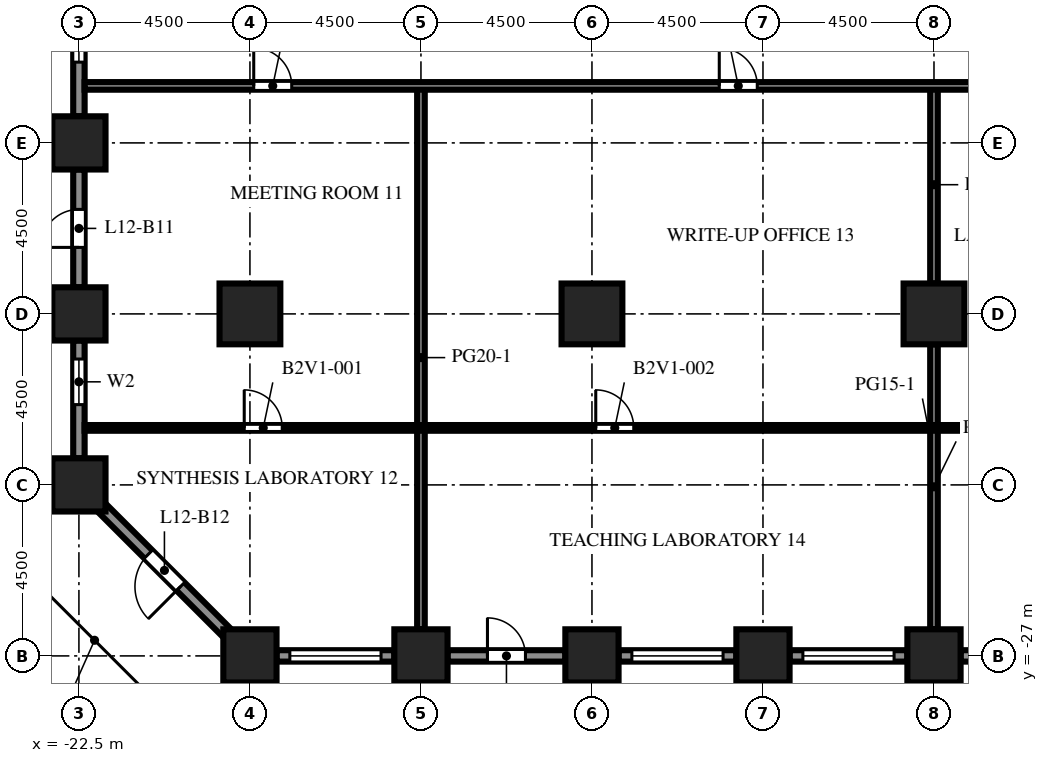
"""IFC4 building model, lengths in metres.
Left out: names, types, materials, properties, quantities, classifications, styles, units other than length and angle.
Written with IfcOpenShell. Run it as: python <this file> out.ifc"""

import sys

from ifc_helpers import new_model, si_unit, direction, frame, frame_2d, origin, origin_2d, place, context, subcontext, project, spatial, rectangle, extrude, element, fill, save


model = new_model("IFC4")
c1 = context("Model", 3, precision=1e-05, world=origin(), true_north=direction((0.0, 1.0)))
c2 = subcontext(c1, "Body", "Model", "MODEL_VIEW")
j1 = project(units=[si_unit("LENGTHUNIT", "METRE"), si_unit("PLANEANGLEUNIT", "RADIAN")], contexts=[c1])
p1 = place(None, origin())
s1 = spatial("IfcSite", under=j1, at=p1, CompositionType="ELEMENT")
p2 = place(p1, origin())
s2 = spatial("IfcBuilding", under=s1, at=p2, CompositionType="ELEMENT")
p3 = place(p2, frame((0.0, 0.0, 54.2)))
s3 = spatial("IfcBuildingStorey", under=s2, at=p3, CompositionType="ELEMENT", Elevation=54.2)
for number, where, z_axis, x_axis in (
    (1, (-22.5, -22.5, 0.0), (0.0, 0.0, 1.0), (1.0, 0.0, 0.0)),
    (2, (-22.5, -18.0, 0.0), (0.0, 0.0, 1.0), (1.0, 0.0, 0.0)),
    (3, (-22.5, -13.5, 0.0), (0.0, 0.0, 1.0), (1.0, 0.0, 0.0)),
    (4, (-18.0, -27.0, 0.0), (0.0, 0.0, 1.0), (1.0, 0.0, 0.0)),
    (5, (-13.5, -27.0, 0.0), (0.0, 0.0, 1.0), (1.0, 0.0, 0.0)),
    (6, (-9.0, -27.0, 0.0), (0.0, 0.0, 1.0), (1.0, 0.0, 0.0)),
    (7, (-4.5, -27.0, 0.0), (0.0, 0.0, 1.0), (1.0, 0.0, 0.0)),
    (8, (0.0, -27.0, 0.0), (0.0, 0.0, 1.0), (1.0, 0.0, 0.0)),
):
    element("IfcColumn", number, at=place(p3, frame(where, z_axis=z_axis, x_axis=x_axis)), inside=s3, PredefinedType="COLUMN", context=c2, shape_type="SweptSolid", body=[
        extrude(rectangle(XDim=1.4, YDim=1.4, at=origin_2d()), origin(), (0.0, 0.0, 1.0), 4.1),
    ])
for number, where, z_axis, x_axis in (
    (9, (-18.0, -18.0, 0.0), (0.0, 0.0, 1.0), (1.0, 0.0, 0.0)),
    (10, (-9.0, -18.0, 0.0), (0.0, 0.0, 1.0), (1.0, 0.0, 0.0)),
    (11, (0.0, -18.0, 0.0), (0.0, 0.0, 1.0), (1.0, 0.0, 0.0)),
):
    element("IfcColumn", number, at=place(p3, frame(where, z_axis=z_axis, x_axis=x_axis)), inside=s3, PredefinedType="COLUMN", context=c2, shape_type="SweptSolid", body=[
        extrude(rectangle(XDim=1.6, YDim=1.6, at=origin_2d()), origin(), (0.0, 0.0, 1.0), 4.1),
    ])
p4 = place(p3, frame((-14.2, -27.0, 0.0), z_axis=(0.0, 0.0, 1.0), x_axis=(-1.0, 0.0, 0.0)))
e12 = element("IfcWall", 12, at=p4, inside=s3, PredefinedType="SOLIDWALL", context=c2, shape_type="SweptSolid", body=[
    extrude(rectangle(XDim=3.1, YDim=0.3, at=frame_2d((1.55, 0.0))), origin(), (0.0, 0.0, 1.0), 2.75),
])
p5 = place(p4, frame((0.35, 0.0, 0.8)))
e13 = element("IfcOpeningElement", 13, at=p5, cuts=e12, PredefinedType="OPENING", context=c2, shape_type="SweptSolid", body=[
    extrude(rectangle(XDim=2.4, YDim=1.7, at=frame_2d((1.2, 0.85))), frame((0.0, 0.16, 0.0), z_axis=(0.0, -1.0, 0.0), x_axis=(1.0, 0.0, 0.0)), (0.0, 0.0, 1.0), 0.32),
])
p6 = place(p3, frame((-9.7, -27.0, 0.0), z_axis=(0.0, 0.0, 1.0), x_axis=(-1.0, 0.0, 0.0)))
e14 = element("IfcWall", 14, at=p6, inside=s3, PredefinedType="SOLIDWALL", context=c2, shape_type="SweptSolid", body=[
    extrude(rectangle(XDim=3.1, YDim=0.3, at=frame_2d((1.55, 0.0))), origin(), (0.0, 0.0, 1.0), 2.75),
])
p7 = place(p6, frame((1.05, 0.0, 0.0)))
e15 = element("IfcOpeningElement", 15, at=p7, cuts=e14, PredefinedType="OPENING", context=c2, shape_type="SweptSolid", body=[
    extrude(rectangle(XDim=1.0, YDim=2.2, at=frame_2d((0.5, 1.1))), frame((0.0, 0.16, 0.0), z_axis=(0.0, -1.0, 0.0), x_axis=(1.0, 0.0, 0.0)), (0.0, 0.0, 1.0), 0.32),
])
p8 = place(p3, frame((-5.2, -27.0, 0.0), z_axis=(0.0, 0.0, 1.0), x_axis=(-1.0, 0.0, 0.0)))
e16 = element("IfcWall", 16, at=p8, inside=s3, PredefinedType="SOLIDWALL", context=c2, shape_type="SweptSolid", body=[
    extrude(rectangle(XDim=3.1, YDim=0.3, at=frame_2d((1.55, 0.0))), origin(), (0.0, 0.0, 1.0), 2.75),
])
p9 = place(p8, frame((0.35, 0.0, 0.8)))
e17 = element("IfcOpeningElement", 17, at=p9, cuts=e16, PredefinedType="OPENING", context=c2, shape_type="SweptSolid", body=[
    extrude(rectangle(XDim=2.4, YDim=1.7, at=frame_2d((1.2, 0.85))), frame((0.0, 0.16, 0.0), z_axis=(0.0, -1.0, 0.0), x_axis=(1.0, 0.0, 0.0)), (0.0, 0.0, 1.0), 0.32),
])
p10 = place(p3, frame((-0.7, -27.0, 0.0), z_axis=(0.0, 0.0, 1.0), x_axis=(-1.0, 0.0, 0.0)))
e18 = element("IfcWall", 18, at=p10, inside=s3, PredefinedType="SOLIDWALL", context=c2, shape_type="SweptSolid", body=[
    extrude(rectangle(XDim=3.1, YDim=0.3, at=frame_2d((1.55, 0.0))), origin(), (0.0, 0.0, 1.0), 2.75),
])
p11 = place(p10, frame((0.35, 0.0, 0.8)))
e19 = element("IfcOpeningElement", 19, at=p11, cuts=e18, PredefinedType="OPENING", context=c2, shape_type="SweptSolid", body=[
    extrude(rectangle(XDim=2.4, YDim=1.7, at=frame_2d((1.2, 0.85))), frame((0.0, 0.16, 0.0), z_axis=(0.0, -1.0, 0.0), x_axis=(1.0, 0.0, 0.0)), (0.0, 0.0, 1.0), 0.32),
])
p12 = place(p3, frame((3.8, -27.0, 0.0), z_axis=(0.0, 0.0, 1.0), x_axis=(-1.0, 0.0, 0.0)))
e20 = element("IfcWall", 20, at=p12, inside=s3, PredefinedType="SOLIDWALL", context=c2, shape_type="SweptSolid", body=[
    extrude(rectangle(XDim=3.1, YDim=0.3, at=frame_2d((1.55, 0.0))), origin(), (0.0, 0.0, 1.0), 2.75),
])
p13 = place(p12, frame((0.35, 0.0, 0.8)))
e21 = element("IfcOpeningElement", 21, at=p13, cuts=e20, PredefinedType="OPENING", context=c2, shape_type="SweptSolid", body=[
    extrude(rectangle(XDim=2.4, YDim=1.7, at=frame_2d((1.2, 0.85))), frame((0.0, 0.16, 0.0), z_axis=(0.0, -1.0, 0.0), x_axis=(1.0, 0.0, 0.0)), (0.0, 0.0, 1.0), 0.32),
])
p14 = place(p3, frame((-22.5, -12.8, 0.0), z_axis=(0.0, 0.0, 1.0), x_axis=(0.0, 1.0, 0.0)))
e22 = element("IfcWall", 22, at=p14, inside=s3, PredefinedType="SOLIDWALL", context=c2, shape_type="SweptSolid", body=[
    extrude(rectangle(XDim=3.1, YDim=0.3, at=frame_2d((1.55, 0.0))), origin(), (0.0, 0.0, 1.0), 2.75),
])
p15 = place(p14, frame((1.425, 0.0, 0.8)))
e23 = element("IfcOpeningElement", 23, at=p15, cuts=e22, PredefinedType="OPENING", context=c2, shape_type="SweptSolid", body=[
    extrude(rectangle(XDim=1.2, YDim=1.7, at=frame_2d((0.6, 0.85))), frame((0.0, 0.16, 0.0), z_axis=(0.0, -1.0, 0.0), x_axis=(1.0, 0.0, 0.0)), (0.0, 0.0, 1.0), 0.32),
])
p16 = place(p3, frame((-22.5, -17.3, 0.0), z_axis=(0.0, 0.0, 1.0), x_axis=(0.0, 1.0, 0.0)))
e24 = element("IfcWall", 24, at=p16, inside=s3, PredefinedType="SOLIDWALL", context=c2, shape_type="SweptSolid", body=[
    extrude(rectangle(XDim=3.1, YDim=0.3, at=frame_2d((1.55, 0.0))), origin(), (0.0, 0.0, 1.0), 2.75),
])
p17 = place(p16, frame((1.05, 0.0, 0.0)))
e25 = element("IfcOpeningElement", 25, at=p17, cuts=e24, PredefinedType="OPENING", context=c2, shape_type="SweptSolid", body=[
    extrude(rectangle(XDim=1.0, YDim=2.2, at=frame_2d((0.5, 1.1))), frame((0.0, 0.16, 0.0), z_axis=(0.0, -1.0, 0.0), x_axis=(1.0, 0.0, 0.0)), (0.0, 0.0, 1.0), 0.32),
])
p18 = place(p3, frame((-22.5, -21.8, 0.0), z_axis=(0.0, 0.0, 1.0), x_axis=(0.0, 1.0, 0.0)))
e26 = element("IfcWall", 26, at=p18, inside=s3, PredefinedType="SOLIDWALL", context=c2, shape_type="SweptSolid", body=[
    extrude(rectangle(XDim=3.1, YDim=0.3, at=frame_2d((1.55, 0.0))), origin(), (0.0, 0.0, 1.0), 2.75),
])
p19 = place(p18, frame((1.413, 0.0, 0.8)))
e27 = element("IfcOpeningElement", 27, at=p19, cuts=e26, PredefinedType="OPENING", context=c2, shape_type="SweptSolid", body=[
    extrude(rectangle(XDim=1.2, YDim=1.7, at=frame_2d((0.6, 0.85))), frame((0.0, 0.16, 0.0), z_axis=(0.0, -1.0, 0.0), x_axis=(1.0, 0.0, 0.0)), (0.0, 0.0, 1.0), 0.32),
])
p20 = place(p3, frame((-18.594, -26.406, 0.0), z_axis=(0.0, 0.0, 1.0), x_axis=(-0.707106781187, 0.707106781187, 0.0)))
e28 = element("IfcWall", 28, at=p20, inside=s3, PredefinedType="SOLIDWALL", context=c2, shape_type="SweptSolid", body=[
    extrude(rectangle(XDim=4.684, YDim=0.3, at=frame_2d((2.342, 0.0))), origin(), (0.0, 0.0, 1.0), 2.75),
])
p21 = place(p20, frame((1.742, 0.0, 0.0)))
e29 = element("IfcOpeningElement", 29, at=p21, cuts=e28, PredefinedType="OPENING", context=c2, shape_type="SweptSolid", body=[
    extrude(rectangle(XDim=1.2, YDim=2.2, at=frame_2d((0.6, 1.1))), frame((0.0, 0.16, 0.0), z_axis=(0.0, -1.0, 0.0), x_axis=(1.0, 0.0, 0.0)), (0.0, 0.0, 1.0), 0.32),
])
p22 = place(p3, frame((-13.5, -26.3, 0.0), z_axis=(0.0, 0.0, 1.0), x_axis=(0.0, 1.0, 0.0)))
e30 = element("IfcWall", 30, at=p22, inside=s3, PredefinedType="PARTITIONING", context=c2, shape_type="SweptSolid", body=[
    extrude(rectangle(XDim=14.3, YDim=0.2, at=frame_2d((7.15, 0.0))), origin(), (0.0, 0.0, 1.0), 3.65),
])
p23 = place(p3, frame((0.0, -26.3, 0.0), z_axis=(0.0, 0.0, 1.0), x_axis=(0.0, 1.0, 0.0)))
e31 = element("IfcWall", 31, at=p23, inside=s3, PredefinedType="PARTITIONING", context=c2, shape_type="SweptSolid", body=[
    extrude(rectangle(XDim=7.5, YDim=0.2, at=frame_2d((3.75, 0.0))), origin(), (0.0, 0.0, 1.0), 3.65),
])
p24 = place(p3, frame((0.0, -17.2, 0.0), z_axis=(0.0, 0.0, 1.0), x_axis=(0.0, 1.0, 0.0)))
e32 = element("IfcWall", 32, at=p24, inside=s3, PredefinedType="PARTITIONING", context=c2, shape_type="SweptSolid", body=[
    extrude(rectangle(XDim=5.2, YDim=0.2, at=frame_2d((2.6, 0.0))), origin(), (0.0, 0.0, 1.0), 3.65),
])
p25 = place(p3, frame((31.35, -21.0, 0.0), z_axis=(0.0, 0.0, 1.0), x_axis=(-1.0, 0.0, 0.0)))
e33 = element("IfcWall", 33, at=p25, inside=s3, PredefinedType="PARTITIONING", context=c2, shape_type="SweptSolid", body=[
    extrude(rectangle(XDim=53.7, YDim=0.15, at=frame_2d((26.85, 0.0))), origin(), (0.0, 0.0, 1.0), 3.65),
])
p26 = place(p25, frame((48.5, 0.0, 0.0)))
e34 = element("IfcOpeningElement", 34, at=p26, cuts=e33, PredefinedType="OPENING", context=c2, shape_type="SweptSolid", body=[
    extrude(rectangle(XDim=1.0, YDim=2.1, at=frame_2d((0.5, 1.05))), frame((0.0, 0.085, 0.0), z_axis=(0.0, -1.0, 0.0), x_axis=(1.0, 0.0, 0.0)), (0.0, 0.0, 1.0), 0.17),
])
p27 = place(p25, frame((39.25, 0.0, 0.0)))
e35 = element("IfcOpeningElement", 35, at=p27, cuts=e33, PredefinedType="OPENING", context=c2, shape_type="SweptSolid", body=[
    extrude(rectangle(XDim=1.0, YDim=2.1, at=frame_2d((0.5, 1.05))), frame((0.0, 0.085, 0.0), z_axis=(0.0, -1.0, 0.0), x_axis=(1.0, 0.0, 0.0)), (0.0, 0.0, 1.0), 0.17),
])
p28 = place(p25, frame((22.75, 0.0, 0.0)))
e36 = element("IfcOpeningElement", 36, at=p28, cuts=e33, PredefinedType="OPENING", context=c2, shape_type="SweptSolid", body=[
    extrude(rectangle(XDim=1.0, YDim=2.1, at=frame_2d((0.5, 1.05))), frame((0.0, 0.085, 0.0), z_axis=(0.0, -1.0, 0.0), x_axis=(1.0, 0.0, 0.0)), (0.0, 0.0, 1.0), 0.17),
])
p29 = place(p25, frame((13.5, 0.0, 0.0)))
e37 = element("IfcOpeningElement", 37, at=p29, cuts=e33, PredefinedType="OPENING", context=c2, shape_type="SweptSolid", body=[
    extrude(rectangle(XDim=1.0, YDim=2.1, at=frame_2d((0.5, 1.05))), frame((0.0, 0.085, 0.0), z_axis=(0.0, -1.0, 0.0), x_axis=(1.0, 0.0, 0.0)), (0.0, 0.0, 1.0), 0.17),
])
p30 = place(p25, frame((3.25, 0.0, 0.0)))
e38 = element("IfcOpeningElement", 38, at=p30, cuts=e33, PredefinedType="OPENING", context=c2, shape_type="SweptSolid", body=[
    extrude(rectangle(XDim=1.0, YDim=2.1, at=frame_2d((0.5, 1.05))), frame((0.0, 0.085, 0.0), z_axis=(0.0, -1.0, 0.0), x_axis=(1.0, 0.0, 0.0)), (0.0, 0.0, 1.0), 0.17),
])
p31 = place(p3, frame((31.35, -12.0, 0.0), z_axis=(0.0, 0.0, 1.0), x_axis=(-1.0, 0.0, 0.0)))
e39 = element("IfcWall", 39, at=p31, inside=s3, PredefinedType="PARTITIONING", context=c2, shape_type="SweptSolid", body=[
    extrude(rectangle(XDim=53.7, YDim=0.2, at=frame_2d((26.85, 0.0))), origin(), (0.0, 0.0, 1.0), 3.65),
])
p32 = place(p31, frame((48.25, 0.0, 0.0)))
e40 = element("IfcOpeningElement", 40, at=p32, cuts=e39, PredefinedType="OPENING", context=c2, shape_type="SweptSolid", body=[
    extrude(rectangle(XDim=1.0, YDim=2.1, at=frame_2d((0.5, 1.05))), frame((0.0, 0.11, 0.0), z_axis=(0.0, -1.0, 0.0), x_axis=(1.0, 0.0, 0.0)), (0.0, 0.0, 1.0), 0.22),
])
p33 = place(p31, frame((36.0, 0.0, 0.0)))
e41 = element("IfcOpeningElement", 41, at=p33, cuts=e39, PredefinedType="OPENING", context=c2, shape_type="SweptSolid", body=[
    extrude(rectangle(XDim=1.0, YDim=2.1, at=frame_2d((0.5, 1.05))), frame((0.0, 0.11, 0.0), z_axis=(0.0, -1.0, 0.0), x_axis=(1.0, 0.0, 0.0)), (0.0, 0.0, 1.0), 0.22),
])
p34 = place(p31, frame((25.75, 0.0, 0.0)))
e42 = element("IfcOpeningElement", 42, at=p34, cuts=e39, PredefinedType="OPENING", context=c2, shape_type="SweptSolid", body=[
    extrude(rectangle(XDim=1.0, YDim=2.1, at=frame_2d((0.5, 1.05))), frame((0.0, 0.11, 0.0), z_axis=(0.0, -1.0, 0.0), x_axis=(1.0, 0.0, 0.0)), (0.0, 0.0, 1.0), 0.22),
])
p35 = place(p31, frame((12.5, 0.0, 0.0)))
e43 = element("IfcOpeningElement", 43, at=p35, cuts=e39, PredefinedType="OPENING", context=c2, shape_type="SweptSolid", body=[
    extrude(rectangle(XDim=1.0, YDim=2.1, at=frame_2d((0.5, 1.05))), frame((0.0, 0.11, 0.0), z_axis=(0.0, -1.0, 0.0), x_axis=(1.0, 0.0, 0.0)), (0.0, 0.0, 1.0), 0.22),
])
p36 = place(p31, frame((3.75, 0.0, 0.0)))
e44 = element("IfcOpeningElement", 44, at=p36, cuts=e39, PredefinedType="OPENING", context=c2, shape_type="SweptSolid", body=[
    extrude(rectangle(XDim=1.0, YDim=2.1, at=frame_2d((0.5, 1.05))), frame((0.0, 0.11, 0.0), z_axis=(0.0, -1.0, 0.0), x_axis=(1.0, 0.0, 0.0)), (0.0, 0.0, 1.0), 0.22),
])
p37 = place(p5, origin())
e45 = element("IfcWindow", 45, at=p37, inside=s3, PartitioningType="SINGLE_PANEL", PredefinedType="WINDOW", context=c2, shape_type="SweptSolid", body=[
    extrude(rectangle(XDim=2.4, YDim=1.7, at=frame_2d((1.2, 0.85))), frame((0.0, 0.03, 0.0), z_axis=(0.0, -1.0, 0.0), x_axis=(1.0, 0.0, 0.0)), (0.0, 0.0, 1.0), 0.06),
])
fill(e13, e45)
p38 = place(p7, origin())
e46 = element("IfcDoor", 46, at=p38, inside=s3, OperationType="SINGLE_SWING_RIGHT", PredefinedType="DOOR", context=c2, shape_type="SweptSolid", body=[
    extrude(rectangle(XDim=1.0, YDim=2.2, at=frame_2d((0.5, 1.1))), frame((0.0, 0.025, 0.0), z_axis=(0.0, -1.0, 0.0), x_axis=(1.0, 0.0, 0.0)), (0.0, 0.0, 1.0), 0.05),
])
fill(e15, e46)
p39 = place(p9, origin())
e47 = element("IfcWindow", 47, at=p39, inside=s3, PartitioningType="SINGLE_PANEL", PredefinedType="WINDOW", context=c2, shape_type="SweptSolid", body=[
    extrude(rectangle(XDim=2.4, YDim=1.7, at=frame_2d((1.2, 0.85))), frame((0.0, 0.03, 0.0), z_axis=(0.0, -1.0, 0.0), x_axis=(1.0, 0.0, 0.0)), (0.0, 0.0, 1.0), 0.06),
])
fill(e17, e47)
p40 = place(p11, origin())
e48 = element("IfcWindow", 48, at=p40, inside=s3, PartitioningType="SINGLE_PANEL", PredefinedType="WINDOW", context=c2, shape_type="SweptSolid", body=[
    extrude(rectangle(XDim=2.4, YDim=1.7, at=frame_2d((1.2, 0.85))), frame((0.0, 0.03, 0.0), z_axis=(0.0, -1.0, 0.0), x_axis=(1.0, 0.0, 0.0)), (0.0, 0.0, 1.0), 0.06),
])
fill(e19, e48)
p41 = place(p15, origin())
e49 = element("IfcWindow", 49, at=p41, inside=s3, PartitioningType="SINGLE_PANEL", PredefinedType="WINDOW", context=c2, shape_type="SweptSolid", body=[
    extrude(rectangle(XDim=1.2, YDim=1.7, at=frame_2d((0.6, 0.85))), frame((0.0, 0.03, 0.0), z_axis=(0.0, -1.0, 0.0), x_axis=(1.0, 0.0, 0.0)), (0.0, 0.0, 1.0), 0.06),
])
fill(e23, e49)
p42 = place(p17, origin())
e50 = element("IfcDoor", 50, at=p42, inside=s3, OperationType="SINGLE_SWING_LEFT", PredefinedType="DOOR", context=c2, shape_type="SweptSolid", body=[
    extrude(rectangle(XDim=1.0, YDim=2.2, at=frame_2d((0.5, 1.1))), frame((0.0, 0.025, 0.0), z_axis=(0.0, -1.0, 0.0), x_axis=(1.0, 0.0, 0.0)), (0.0, 0.0, 1.0), 0.05),
])
fill(e25, e50)
p43 = place(p19, origin())
e51 = element("IfcWindow", 51, at=p43, inside=s3, PartitioningType="SINGLE_PANEL", PredefinedType="WINDOW", context=c2, shape_type="SweptSolid", body=[
    extrude(rectangle(XDim=1.2, YDim=1.7, at=frame_2d((0.6, 0.85))), frame((0.0, 0.03, 0.0), z_axis=(0.0, -1.0, 0.0), x_axis=(1.0, 0.0, 0.0)), (0.0, 0.0, 1.0), 0.06),
])
fill(e27, e51)
p44 = place(p21, origin())
e52 = element("IfcDoor", 52, at=p44, inside=s3, OperationType="SINGLE_SWING_LEFT", PredefinedType="DOOR", context=c2, shape_type="SweptSolid", body=[
    extrude(rectangle(XDim=1.2, YDim=2.2, at=frame_2d((0.6, 1.1))), frame((0.0, 0.025, 0.0), z_axis=(0.0, -1.0, 0.0), x_axis=(1.0, 0.0, 0.0)), (0.0, 0.0, 1.0), 0.05),
])
fill(e29, e52)
p45 = place(p26, origin())
e53 = element("IfcDoor", 53, at=p45, inside=s3, OperationType="SINGLE_SWING_RIGHT", PredefinedType="DOOR", context=c2, shape_type="SweptSolid", body=[
    extrude(rectangle(XDim=1.0, YDim=2.1, at=frame_2d((0.5, 1.05))), frame((0.0, 0.025, 0.0), z_axis=(0.0, -1.0, 0.0), x_axis=(1.0, 0.0, 0.0)), (0.0, 0.0, 1.0), 0.05),
])
fill(e34, e53)
p46 = place(p27, origin())
e54 = element("IfcDoor", 54, at=p46, inside=s3, OperationType="SINGLE_SWING_RIGHT", PredefinedType="DOOR", context=c2, shape_type="SweptSolid", body=[
    extrude(rectangle(XDim=1.0, YDim=2.1, at=frame_2d((0.5, 1.05))), frame((0.0, 0.025, 0.0), z_axis=(0.0, -1.0, 0.0), x_axis=(1.0, 0.0, 0.0)), (0.0, 0.0, 1.0), 0.05),
])
fill(e35, e54)
p47 = place(p32, origin())
e55 = element("IfcDoor", 55, at=p47, inside=s3, OperationType="SINGLE_SWING_RIGHT", PredefinedType="DOOR", context=c2, shape_type="SweptSolid", body=[
    extrude(rectangle(XDim=1.0, YDim=2.1, at=frame_2d((0.5, 1.05))), frame((0.0, 0.025, 0.0), z_axis=(0.0, -1.0, 0.0), x_axis=(1.0, 0.0, 0.0)), (0.0, 0.0, 1.0), 0.05),
])
fill(e40, e55)
p48 = place(p33, origin())
e56 = element("IfcDoor", 56, at=p48, inside=s3, OperationType="SINGLE_SWING_RIGHT", PredefinedType="DOOR", context=c2, shape_type="SweptSolid", body=[
    extrude(rectangle(XDim=1.0, YDim=2.1, at=frame_2d((0.5, 1.05))), frame((0.0, 0.025, 0.0), z_axis=(0.0, -1.0, 0.0), x_axis=(1.0, 0.0, 0.0)), (0.0, 0.0, 1.0), 0.05),
])
fill(e41, e56)
save(model, sys.argv[1])
